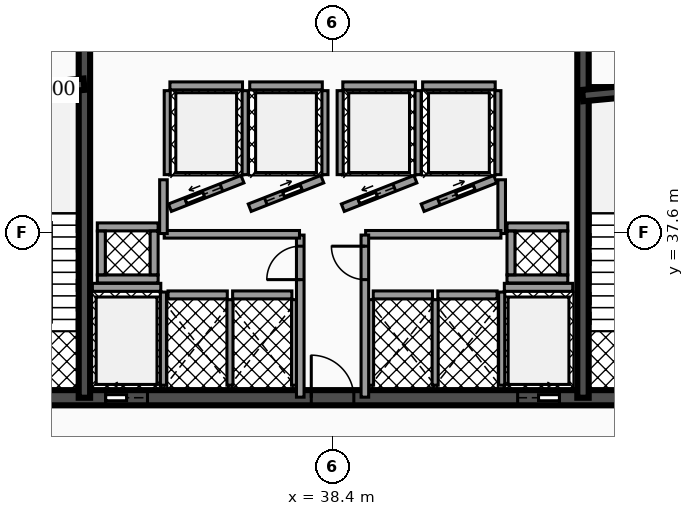
"""IFC4 building model, lengths in metres.
Left out: names, types, materials, properties, quantities, classifications, styles, units other than length and angle.
Written with IfcOpenShell. Run it as: python <this file> out.ifc"""

import sys

from ifc_helpers import new_model, si_unit, direction, frame, frame_2d, origin, place, context, subcontext, project, spatial, rectangle, extrude, element, fill, save


model = new_model("IFC4")
c1 = context("Model", 3, precision=1e-05, world=origin(), true_north=direction((0.0, 1.0)))
c2 = subcontext(c1, "Body", "Model", "MODEL_VIEW")
j1 = project(units=[si_unit("LENGTHUNIT", "METRE"), si_unit("PLANEANGLEUNIT", "RADIAN")], contexts=[c1])
p1 = place(None, origin())
s1 = spatial("IfcSite", under=j1, at=p1, CompositionType="ELEMENT")
p2 = place(p1, origin())
s2 = spatial("IfcBuilding", under=s1, at=p2, CompositionType="ELEMENT")
p3 = place(p2, frame((0.0, 0.0, 80.58)))
s3 = spatial("IfcBuildingStorey", under=s2, at=p3, CompositionType="ELEMENT", Elevation=80.58)
p4 = place(p3, frame((28.4, 33.25, 0.0), z_axis=(0.0, 0.0, 1.0), x_axis=(1.0, 0.0, 0.0)))
e1 = element("IfcWall", 1, at=p4, inside=s3, PredefinedType="SHEAR", context=c2, shape_type="SweptSolid", body=[
    extrude(rectangle(XDim=20.06, YDim=0.4, at=frame_2d((10.03, 0.0))), origin(), (0.0, 0.0, 1.0), 3.82),
])
p5 = place(p4, frame((4.03, 0.0, 0.0)))
e2 = element("IfcOpeningElement", 2, at=p5, cuts=e1, PredefinedType="OPENING", context=c2, shape_type="SweptSolid", body=[
    extrude(rectangle(XDim=1.1, YDim=2.15, at=frame_2d((0.55, 1.075))), frame((0.0, 0.21, 0.0), z_axis=(0.0, -1.0, 0.0), x_axis=(1.0, 0.0, 0.0)), (0.0, 0.0, 1.0), 0.42),
])
p6 = place(p4, frame((14.87, 0.0, 0.0)))
e3 = element("IfcOpeningElement", 3, at=p6, cuts=e1, PredefinedType="OPENING", context=c2, shape_type="SweptSolid", body=[
    extrude(rectangle(XDim=1.1, YDim=2.15, at=frame_2d((0.55, 1.075))), frame((0.0, 0.21, 0.0), z_axis=(0.0, -1.0, 0.0), x_axis=(1.0, 0.0, 0.0)), (0.0, 0.0, 1.0), 0.42),
])
p7 = place(p4, frame((1.31, 0.0, 0.0)))
e4 = element("IfcOpeningElement", 4, at=p7, cuts=e1, PredefinedType="OPENING", context=c2, shape_type="SweptSolid", body=[
    extrude(rectangle(XDim=1.1, YDim=2.2, at=frame_2d((0.55, 1.1))), frame((0.0, 0.21, 0.0), z_axis=(0.0, -1.0, 0.0), x_axis=(1.0, 0.0, 0.0)), (0.0, 0.0, 1.0), 0.42),
])
p8 = place(p4, frame((9.44, 0.0, 0.0)))
e5 = element("IfcOpeningElement", 5, at=p8, cuts=e1, PredefinedType="OPENING", context=c2, shape_type="SweptSolid", body=[
    extrude(rectangle(XDim=1.12, YDim=2.05, at=frame_2d((0.56, 1.025))), frame((0.0, 0.21, 0.0), z_axis=(0.0, -1.0, 0.0), x_axis=(1.0, 0.0, 0.0)), (0.0, 0.0, 1.0), 0.42),
])
p9 = place(p4, frame((17.65, 0.0, 0.0)))
e6 = element("IfcOpeningElement", 6, at=p9, cuts=e1, PredefinedType="OPENING", context=c2, shape_type="SweptSolid", body=[
    extrude(rectangle(XDim=1.1, YDim=2.2, at=frame_2d((0.55, 1.1))), frame((0.0, 0.21, 0.0), z_axis=(0.0, -1.0, 0.0), x_axis=(1.0, 0.0, 0.0)), (0.0, 0.0, 1.0), 0.42),
])
for number, where, z_axis, x_axis in (
    (7, (31.87, 33.25, 0.0), (0.0, 0.0, 1.0), (0.0, 1.0, 0.0)),
    (8, (44.99, 33.25, 0.0), (0.0, 0.0, 1.0), (0.0, 1.0, 0.0)),
):
    element("IfcWall", number, at=place(p3, frame(where, z_axis=z_axis, x_axis=x_axis)), inside=s3, PredefinedType="SHEAR", context=c2, shape_type="SweptSolid", body=[
        extrude(rectangle(XDim=10.2, YDim=0.3, at=frame_2d((5.1, 0.0))), origin(), (0.0, 0.0, 1.0), 3.82),
    ])
p10 = place(p3, frame((28.64, 41.2, 0.0), z_axis=(0.0, 0.0, 1.0), x_axis=(0.995687118776, 0.092774789157, 0.0)))
e9 = element("IfcWall", 9, at=p10, inside=s3, PredefinedType="SHEAR", context=c2, shape_type="SweptSolid", body=[
    extrude(rectangle(XDim=3.234, YDim=0.3, at=frame_2d((1.617, 0.0))), origin(), (0.0, 0.0, 1.0), 3.82),
])
p11 = place(p3, frame((44.98, 41.2, 0.0), z_axis=(0.0, 0.0, 1.0), x_axis=(0.995686468965, 0.09278176286, 0.0)))
e10 = element("IfcWall", 10, at=p11, inside=s3, PredefinedType="SHEAR", context=c2, shape_type="SweptSolid", body=[
    extrude(rectangle(XDim=3.234, YDim=0.3, at=frame_2d((1.617, 0.0))), origin(), (0.0, 0.0, 1.0), 3.82),
])
p12 = place(p3, frame((32.08, 36.155, 0.0), z_axis=(0.0, 0.0, 1.0), x_axis=(1.0, 0.0, 0.0)))
e11 = element("IfcWall", 11, at=p12, inside=s3, PredefinedType="SOLIDWALL", context=c2, shape_type="SweptSolid", body=[
    extrude(rectangle(XDim=1.8, YDim=0.21, at=frame_2d((0.9, 0.0))), origin(), (0.0, 0.0, 1.0), 2.792),
])
p13 = place(p3, frame((33.95, 33.58, 0.0), z_axis=(0.0, 0.0, 1.0), x_axis=(0.0, 1.0, 0.0)))
e12 = element("IfcWall", 12, at=p13, inside=s3, PredefinedType="SOLIDWALL", context=c2, shape_type="SweptSolid", body=[
    extrude(rectangle(XDim=2.45, YDim=0.16, at=frame_2d((1.225, 0.0))), origin(), (0.0, 0.0, 1.0), 2.792),
])
p14 = place(p3, frame((42.92, 36.155, 0.0), z_axis=(0.0, 0.0, 1.0), x_axis=(1.0, 0.0, 0.0)))
e13 = element("IfcWall", 13, at=p14, inside=s3, PredefinedType="SOLIDWALL", context=c2, shape_type="SweptSolid", body=[
    extrude(rectangle(XDim=1.8, YDim=0.21, at=frame_2d((0.9, 0.0))), origin(), (0.0, 0.0, 1.0), 2.792),
])
p15 = place(p3, frame((42.85, 33.58, 0.0), z_axis=(0.0, 0.0, 1.0), x_axis=(0.0, 1.0, 0.0)))
e14 = element("IfcWall", 14, at=p15, inside=s3, PredefinedType="SOLIDWALL", context=c2, shape_type="SweptSolid", body=[
    extrude(rectangle(XDim=2.45, YDim=0.16, at=frame_2d((1.225, 0.0))), origin(), (0.0, 0.0, 1.0), 2.792),
])
p16 = place(p3, frame((34.12, 38.25, 0.0), z_axis=(0.0, 0.0, 1.0), x_axis=(0.930804993012, 0.36551616241, 0.0)))
e15 = element("IfcWall", 15, at=p16, inside=s3, PredefinedType="SOLIDWALL", context=c2, shape_type="SweptSolid", body=[
    extrude(rectangle(XDim=2.052, YDim=0.21, at=frame_2d((1.026, 0.0))), origin(), (0.0, 0.0, 1.0), 2.792),
])
p17 = place(p16, frame((0.455, 0.0, 0.0)))
e16 = element("IfcOpeningElement", 16, at=p17, cuts=e15, PredefinedType="OPENING", context=c2, shape_type="SweptSolid", body=[
    extrude(rectangle(XDim=1.0, YDim=2.1, at=frame_2d((0.5, 1.05))), frame((0.0, 0.115, 0.0), z_axis=(0.0, -1.0, 0.0), x_axis=(1.0, 0.0, 0.0)), (0.0, 0.0, 1.0), 0.23),
])
p18 = place(p3, frame((34.12, 41.455, 0.0), z_axis=(0.0, 0.0, 1.0), x_axis=(1.0, 0.0, 0.0)))
e17 = element("IfcWall", 17, at=p18, inside=s3, PredefinedType="SOLIDWALL", context=c2, shape_type="SweptSolid", body=[
    extrude(rectangle(XDim=1.91, YDim=0.21, at=frame_2d((0.955, 0.0))), origin(), (0.0, 0.0, 1.0), 2.792),
])
for number, where, z_axis, x_axis in (
    (18, (34.05, 39.12, 0.0), (0.0, 0.0, 1.0), (0.0, 1.0, 0.0)),
    (19, (36.1, 39.12, 0.0), (0.0, 0.0, 1.0), (0.0, 1.0, 0.0)),
):
    element("IfcWall", number, at=place(p3, frame(where, z_axis=z_axis, x_axis=x_axis)), inside=s3, PredefinedType="SOLIDWALL", context=c2, shape_type="SweptSolid", body=[
        extrude(rectangle(XDim=2.21, YDim=0.16, at=frame_2d((1.105, 0.0))), origin(), (0.0, 0.0, 1.0), 2.792),
    ])
p19 = place(p3, frame((36.22, 38.25, 0.0), z_axis=(0.0, 0.0, 1.0), x_axis=(0.930804993012, 0.36551616241, 0.0)))
e20 = element("IfcWall", 20, at=p19, inside=s3, PredefinedType="SOLIDWALL", context=c2, shape_type="SweptSolid", body=[
    extrude(rectangle(XDim=2.052, YDim=0.21, at=frame_2d((1.026, 0.0))), origin(), (0.0, 0.0, 1.0), 2.792),
])
p20 = place(p19, frame((0.455, 0.0, 0.0)))
e21 = element("IfcOpeningElement", 21, at=p20, cuts=e20, PredefinedType="OPENING", context=c2, shape_type="SweptSolid", body=[
    extrude(rectangle(XDim=1.0, YDim=2.1, at=frame_2d((0.5, 1.05))), frame((0.0, 0.115, 0.0), z_axis=(0.0, -1.0, 0.0), x_axis=(1.0, 0.0, 0.0)), (0.0, 0.0, 1.0), 0.23),
])
p21 = place(p3, frame((36.22, 41.455, 0.0), z_axis=(0.0, 0.0, 1.0), x_axis=(1.0, 0.0, 0.0)))
e22 = element("IfcWall", 22, at=p21, inside=s3, PredefinedType="SOLIDWALL", context=c2, shape_type="SweptSolid", body=[
    extrude(rectangle(XDim=1.91, YDim=0.21, at=frame_2d((0.955, 0.0))), origin(), (0.0, 0.0, 1.0), 2.792),
])
p22 = place(p3, frame((38.2, 39.12, 0.0), z_axis=(0.0, 0.0, 1.0), x_axis=(0.0, 1.0, 0.0)))
e23 = element("IfcWall", 23, at=p22, inside=s3, PredefinedType="SOLIDWALL", context=c2, shape_type="SweptSolid", body=[
    extrude(rectangle(XDim=2.21, YDim=0.16, at=frame_2d((1.105, 0.0))), origin(), (0.0, 0.0, 1.0), 2.792),
])
p23 = place(p3, frame((38.67, 38.25, 0.0), z_axis=(0.0, 0.0, 1.0), x_axis=(0.930820886763, 0.3654756856, 0.0)))
e24 = element("IfcWall", 24, at=p23, inside=s3, PredefinedType="SOLIDWALL", context=c2, shape_type="SweptSolid", body=[
    extrude(rectangle(XDim=2.052, YDim=0.21, at=frame_2d((1.026, 0.0))), origin(), (0.0, 0.0, 1.0), 2.792),
])
p24 = place(p23, frame((0.455, 0.0, 0.0)))
e25 = element("IfcOpeningElement", 25, at=p24, cuts=e24, PredefinedType="OPENING", context=c2, shape_type="SweptSolid", body=[
    extrude(rectangle(XDim=1.0, YDim=2.1, at=frame_2d((0.5, 1.05))), frame((0.0, 0.115, 0.0), z_axis=(0.0, -1.0, 0.0), x_axis=(1.0, 0.0, 0.0)), (0.0, 0.0, 1.0), 0.23),
])
p25 = place(p3, frame((38.67, 41.455, 0.0), z_axis=(0.0, 0.0, 1.0), x_axis=(1.0, 0.0, 0.0)))
e26 = element("IfcWall", 26, at=p25, inside=s3, PredefinedType="SOLIDWALL", context=c2, shape_type="SweptSolid", body=[
    extrude(rectangle(XDim=1.91, YDim=0.21, at=frame_2d((0.955, 0.0))), origin(), (0.0, 0.0, 1.0), 2.792),
])
for number, where, z_axis, x_axis in (
    (27, (38.6, 39.12, 0.0), (0.0, 0.0, 1.0), (0.0, 1.0, 0.0)),
    (28, (40.65, 39.12, 0.0), (0.0, 0.0, 1.0), (0.0, 1.0, 0.0)),
):
    element("IfcWall", number, at=place(p3, frame(where, z_axis=z_axis, x_axis=x_axis)), inside=s3, PredefinedType="SOLIDWALL", context=c2, shape_type="SweptSolid", body=[
        extrude(rectangle(XDim=2.21, YDim=0.16, at=frame_2d((1.105, 0.0))), origin(), (0.0, 0.0, 1.0), 2.792),
    ])
p26 = place(p3, frame((40.77, 38.25, 0.0), z_axis=(0.0, 0.0, 1.0), x_axis=(0.930804993012, 0.36551616241, 0.0)))
e29 = element("IfcWall", 29, at=p26, inside=s3, PredefinedType="SOLIDWALL", context=c2, shape_type="SweptSolid", body=[
    extrude(rectangle(XDim=2.052, YDim=0.21, at=frame_2d((1.026, 0.0))), origin(), (0.0, 0.0, 1.0), 2.792),
])
p27 = place(p26, frame((0.455, 0.0, 0.0)))
e30 = element("IfcOpeningElement", 30, at=p27, cuts=e29, PredefinedType="OPENING", context=c2, shape_type="SweptSolid", body=[
    extrude(rectangle(XDim=1.0, YDim=2.1, at=frame_2d((0.5, 1.05))), frame((0.0, 0.115, 0.0), z_axis=(0.0, -1.0, 0.0), x_axis=(1.0, 0.0, 0.0)), (0.0, 0.0, 1.0), 0.23),
])
p28 = place(p3, frame((40.77, 41.455, 0.0), z_axis=(0.0, 0.0, 1.0), x_axis=(1.0, 0.0, 0.0)))
e31 = element("IfcWall", 31, at=p28, inside=s3, PredefinedType="SOLIDWALL", context=c2, shape_type="SweptSolid", body=[
    extrude(rectangle(XDim=1.91, YDim=0.21, at=frame_2d((0.955, 0.0))), origin(), (0.0, 0.0, 1.0), 2.792),
])
p29 = place(p3, frame((42.75, 39.12, 0.0), z_axis=(0.0, 0.0, 1.0), x_axis=(0.0, 1.0, 0.0)))
e32 = element("IfcWall", 32, at=p29, inside=s3, PredefinedType="SOLIDWALL", context=c2, shape_type="SweptSolid", body=[
    extrude(rectangle(XDim=2.21, YDim=0.16, at=frame_2d((1.105, 0.0))), origin(), (0.0, 0.0, 1.0), 2.792),
])
p30 = place(p3, frame((34.07, 35.955, 0.0), z_axis=(0.0, 0.0, 1.0), x_axis=(1.0, 0.0, 0.0)))
e33 = element("IfcWall", 33, at=p30, inside=s3, PredefinedType="SOLIDWALL", context=c2, shape_type="SweptSolid", body=[
    extrude(rectangle(XDim=1.56, YDim=0.21, at=frame_2d((0.78, 0.0))), origin(), (0.0, 0.0, 1.0), 2.792),
])
p31 = place(p3, frame((35.7, 33.58, 0.0), z_axis=(0.0, 0.0, 1.0), x_axis=(0.0, 1.0, 0.0)))
e34 = element("IfcWall", 34, at=p31, inside=s3, PredefinedType="SOLIDWALL", context=c2, shape_type="SweptSolid", body=[
    extrude(rectangle(XDim=2.25, YDim=0.16, at=frame_2d((1.125, 0.0))), origin(), (0.0, 0.0, 1.0), 2.792),
])
p32 = place(p3, frame((35.77, 35.955, 0.0), z_axis=(0.0, 0.0, 1.0), x_axis=(1.0, 0.0, 0.0)))
e35 = element("IfcWall", 35, at=p32, inside=s3, PredefinedType="SOLIDWALL", context=c2, shape_type="SweptSolid", body=[
    extrude(rectangle(XDim=1.56, YDim=0.21, at=frame_2d((0.78, 0.0))), origin(), (0.0, 0.0, 1.0), 2.792),
])
p33 = place(p3, frame((37.4, 33.58, 0.0), z_axis=(0.0, 0.0, 1.0), x_axis=(0.0, 1.0, 0.0)))
e36 = element("IfcWall", 36, at=p33, inside=s3, PredefinedType="SOLIDWALL", context=c2, shape_type="SweptSolid", body=[
    extrude(rectangle(XDim=2.25, YDim=0.16, at=frame_2d((1.125, 0.0))), origin(), (0.0, 0.0, 1.0), 2.792),
])
p34 = place(p3, frame((39.47, 35.955, 0.0), z_axis=(0.0, 0.0, 1.0), x_axis=(1.0, 0.0, 0.0)))
e37 = element("IfcWall", 37, at=p34, inside=s3, PredefinedType="SOLIDWALL", context=c2, shape_type="SweptSolid", body=[
    extrude(rectangle(XDim=1.56, YDim=0.21, at=frame_2d((0.78, 0.0))), origin(), (0.0, 0.0, 1.0), 2.792),
])
for number, where, z_axis, x_axis in (
    (38, (39.4, 33.58, 0.0), (0.0, 0.0, 1.0), (0.0, 1.0, 0.0)),
    (39, (41.1, 33.58, 0.0), (0.0, 0.0, 1.0), (0.0, 1.0, 0.0)),
):
    element("IfcWall", number, at=place(p3, frame(where, z_axis=z_axis, x_axis=x_axis)), inside=s3, PredefinedType="SOLIDWALL", context=c2, shape_type="SweptSolid", body=[
        extrude(rectangle(XDim=2.25, YDim=0.16, at=frame_2d((1.125, 0.0))), origin(), (0.0, 0.0, 1.0), 2.792),
    ])
p35 = place(p3, frame((41.17, 35.955, 0.0), z_axis=(0.0, 0.0, 1.0), x_axis=(1.0, 0.0, 0.0)))
e40 = element("IfcWall", 40, at=p35, inside=s3, PredefinedType="SOLIDWALL", context=c2, shape_type="SweptSolid", body=[
    extrude(rectangle(XDim=1.56, YDim=0.21, at=frame_2d((0.78, 0.0))), origin(), (0.0, 0.0, 1.0), 2.792),
])
for number, where, z_axis, x_axis in (
    (41, (32.21, 36.375, 0.0), (0.0, 0.0, 1.0), (1.0, 0.0, 0.0)),
    (42, (32.21, 37.745, 0.0), (0.0, 0.0, 1.0), (1.0, 0.0, 0.0)),
):
    element("IfcWall", number, at=place(p3, frame(where, z_axis=z_axis, x_axis=x_axis)), inside=s3, PredefinedType="SOLIDWALL", context=c2, shape_type="SweptSolid", body=[
        extrude(rectangle(XDim=1.6, YDim=0.21, at=frame_2d((0.8, 0.0))), origin(), (0.0, 0.0, 1.0), 3.82),
    ])
for number, where, z_axis, x_axis in (
    (43, (32.315, 36.485, 0.0), (0.0, 0.0, 1.0), (0.0, 1.0, 0.0)),
    (44, (33.705, 36.485, 0.0), (0.0, 0.0, 1.0), (0.0, 1.0, 0.0)),
):
    element("IfcWall", number, at=place(p3, frame(where, z_axis=z_axis, x_axis=x_axis)), inside=s3, PredefinedType="SOLIDWALL", context=c2, shape_type="SweptSolid", body=[
        extrude(rectangle(XDim=1.15, YDim=0.21, at=frame_2d((0.575, 0.0))), origin(), (0.0, 0.0, 1.0), 3.82),
    ])
for number, where, z_axis, x_axis in (
    (45, (42.99, 36.375, 0.0), (0.0, 0.0, 1.0), (1.0, 0.0, 0.0)),
    (46, (42.99, 37.745, 0.0), (0.0, 0.0, 1.0), (1.0, 0.0, 0.0)),
):
    element("IfcWall", number, at=place(p3, frame(where, z_axis=z_axis, x_axis=x_axis)), inside=s3, PredefinedType="SOLIDWALL", context=c2, shape_type="SweptSolid", body=[
        extrude(rectangle(XDim=1.6, YDim=0.21, at=frame_2d((0.8, 0.0))), origin(), (0.0, 0.0, 1.0), 3.82),
    ])
for number, where, z_axis, x_axis in (
    (47, (43.095, 36.485, 0.0), (0.0, 0.0, 1.0), (0.0, 1.0, 0.0)),
    (48, (44.485, 36.485, 0.0), (0.0, 0.0, 1.0), (0.0, 1.0, 0.0)),
):
    element("IfcWall", number, at=place(p3, frame(where, z_axis=z_axis, x_axis=x_axis)), inside=s3, PredefinedType="SOLIDWALL", context=c2, shape_type="SweptSolid", body=[
        extrude(rectangle(XDim=1.15, YDim=0.21, at=frame_2d((0.575, 0.0))), origin(), (0.0, 0.0, 1.0), 3.82),
    ])
p36 = place(p3, frame((37.55, 33.265, 0.0), z_axis=(0.0, 0.0, 1.0), x_axis=(0.0, 1.0, 0.0)))
e49 = element("IfcWall", 49, at=p36, inside=s3, PredefinedType="PARTITIONING", context=c2, shape_type="SweptSolid", body=[
    extrude(rectangle(XDim=4.265, YDim=0.2, at=frame_2d((2.133, 0.0))), origin(), (0.0, 0.0, 1.0), 2.777),
])
p37 = place(p36, frame((3.093, 0.0, 0.0)))
e50 = element("IfcOpeningElement", 50, at=p37, cuts=e49, PredefinedType="OPENING", context=c2, shape_type="SweptSolid", body=[
    extrude(rectangle(XDim=0.88, YDim=2.05, at=frame_2d((0.44, 1.025))), frame((0.0, 0.11, 0.0), z_axis=(0.0, -1.0, 0.0), x_axis=(1.0, 0.0, 0.0)), (0.0, 0.0, 1.0), 0.22),
])
p38 = place(p3, frame((33.97, 37.55, 0.0), z_axis=(0.0, 0.0, 1.0), x_axis=(1.0, 0.0, 0.0)))
e51 = element("IfcWall", 51, at=p38, inside=s3, PredefinedType="PARTITIONING", context=c2, shape_type="SweptSolid", body=[
    extrude(rectangle(XDim=3.56, YDim=0.2, at=frame_2d((1.78, 0.0))), origin(), (0.0, 0.0, 1.0), 2.777),
])
for number, where, z_axis, x_axis in (
    (52, (33.95, 37.57, 0.0), (0.0, 0.0, 1.0), (0.0, 1.0, 0.0)),
    (53, (42.85, 37.57, 0.0), (0.0, 0.0, 1.0), (0.0, 1.0, 0.0)),
):
    element("IfcWall", number, at=place(p3, frame(where, z_axis=z_axis, x_axis=x_axis)), inside=s3, PredefinedType="PARTITIONING", context=c2, shape_type="SweptSolid", body=[
        extrude(rectangle(XDim=1.415, YDim=0.2, at=frame_2d((0.708, 0.0))), origin(), (0.0, 0.0, 1.0), 2.777),
    ])
p39 = place(p3, frame((39.27, 37.55, 0.0), z_axis=(0.0, 0.0, 1.0), x_axis=(1.0, 0.0, 0.0)))
e54 = element("IfcWall", 54, at=p39, inside=s3, PredefinedType="PARTITIONING", context=c2, shape_type="SweptSolid", body=[
    extrude(rectangle(XDim=3.56, YDim=0.2, at=frame_2d((1.78, 0.0))), origin(), (0.0, 0.0, 1.0), 2.777),
])
p40 = place(p3, frame((39.25, 33.265, 0.0), z_axis=(0.0, 0.0, 1.0), x_axis=(0.0, 1.0, 0.0)))
e55 = element("IfcWall", 55, at=p40, inside=s3, PredefinedType="PARTITIONING", context=c2, shape_type="SweptSolid", body=[
    extrude(rectangle(XDim=4.265, YDim=0.2, at=frame_2d((2.133, 0.0))), origin(), (0.0, 0.0, 1.0), 2.777),
])
p41 = place(p40, frame((3.093, 0.0, 0.0)))
e56 = element("IfcOpeningElement", 56, at=p41, cuts=e55, PredefinedType="OPENING", context=c2, shape_type="SweptSolid", body=[
    extrude(rectangle(XDim=0.88, YDim=2.05, at=frame_2d((0.44, 1.025))), frame((0.0, 0.11, 0.0), z_axis=(0.0, -1.0, 0.0), x_axis=(1.0, 0.0, 0.0)), (0.0, 0.0, 1.0), 0.22),
])
p42 = place(p5, origin())
e57 = element("IfcDoor", 57, at=p42, inside=s3, OperationType="SLIDING_TO_LEFT", PredefinedType="DOOR", context=c2, shape_type="SweptSolid", body=[
    extrude(rectangle(XDim=1.1, YDim=2.15, at=frame_2d((0.55, 1.075))), frame((0.0, 0.025, 0.0), z_axis=(0.0, -1.0, 0.0), x_axis=(1.0, 0.0, 0.0)), (0.0, 0.0, 1.0), 0.05),
])
fill(e2, e57)
p43 = place(p6, origin())
e58 = element("IfcDoor", 58, at=p43, inside=s3, OperationType="SLIDING_TO_RIGHT", PredefinedType="DOOR", context=c2, shape_type="SweptSolid", body=[
    extrude(rectangle(XDim=1.1, YDim=2.15, at=frame_2d((0.55, 1.075))), frame((0.0, 0.025, 0.0), z_axis=(0.0, -1.0, 0.0), x_axis=(1.0, 0.0, 0.0)), (0.0, 0.0, 1.0), 0.05),
])
fill(e3, e58)
p44 = place(p17, origin())
e59 = element("IfcDoor", 59, at=p44, inside=s3, OperationType="SLIDING_TO_LEFT", PredefinedType="DOOR", context=c2, shape_type="SweptSolid", body=[
    extrude(rectangle(XDim=1.0, YDim=2.1, at=frame_2d((0.5, 1.05))), frame((0.0, 0.025, 0.0), z_axis=(0.0, -1.0, 0.0), x_axis=(1.0, 0.0, 0.0)), (0.0, 0.0, 1.0), 0.05),
])
fill(e16, e59)
p45 = place(p20, origin())
e60 = element("IfcDoor", 60, at=p45, inside=s3, OperationType="SLIDING_TO_RIGHT", PredefinedType="DOOR", context=c2, shape_type="SweptSolid", body=[
    extrude(rectangle(XDim=1.0, YDim=2.1, at=frame_2d((0.5, 1.05))), frame((0.0, 0.025, 0.0), z_axis=(0.0, -1.0, 0.0), x_axis=(1.0, 0.0, 0.0)), (0.0, 0.0, 1.0), 0.05),
])
fill(e21, e60)
p46 = place(p24, origin())
e61 = element("IfcDoor", 61, at=p46, inside=s3, OperationType="SLIDING_TO_LEFT", PredefinedType="DOOR", context=c2, shape_type="SweptSolid", body=[
    extrude(rectangle(XDim=1.0, YDim=2.1, at=frame_2d((0.5, 1.05))), frame((0.0, 0.025, 0.0), z_axis=(0.0, -1.0, 0.0), x_axis=(1.0, 0.0, 0.0)), (0.0, 0.0, 1.0), 0.05),
])
fill(e25, e61)
p47 = place(p27, origin())
e62 = element("IfcDoor", 62, at=p47, inside=s3, OperationType="SLIDING_TO_RIGHT", PredefinedType="DOOR", context=c2, shape_type="SweptSolid", body=[
    extrude(rectangle(XDim=1.0, YDim=2.1, at=frame_2d((0.5, 1.05))), frame((0.0, 0.025, 0.0), z_axis=(0.0, -1.0, 0.0), x_axis=(1.0, 0.0, 0.0)), (0.0, 0.0, 1.0), 0.05),
])
fill(e30, e62)
p48 = place(p8, origin())
e63 = element("IfcDoor", 63, at=p48, inside=s3, OperationType="SINGLE_SWING_LEFT", PredefinedType="DOOR", context=c2, shape_type="SweptSolid", body=[
    extrude(rectangle(XDim=1.12, YDim=2.05, at=frame_2d((0.56, 1.025))), frame((0.0, 0.025, 0.0), z_axis=(0.0, -1.0, 0.0), x_axis=(1.0, 0.0, 0.0)), (0.0, 0.0, 1.0), 0.05),
])
fill(e5, e63)
p49 = place(p37, origin())
e64 = element("IfcDoor", 64, at=p49, inside=s3, OperationType="SINGLE_SWING_LEFT", PredefinedType="DOOR", context=c2, shape_type="SweptSolid", body=[
    extrude(rectangle(XDim=0.88, YDim=2.05, at=frame_2d((0.44, 1.025))), frame((0.0, 0.025, 0.0), z_axis=(0.0, -1.0, 0.0), x_axis=(1.0, 0.0, 0.0)), (0.0, 0.0, 1.0), 0.05),
])
fill(e50, e64)
p50 = place(p41, origin())
e65 = element("IfcDoor", 65, at=p50, inside=s3, OperationType="SINGLE_SWING_RIGHT", PredefinedType="DOOR", context=c2, shape_type="SweptSolid", body=[
    extrude(rectangle(XDim=0.88, YDim=2.05, at=frame_2d((0.44, 1.025))), frame((0.0, 0.025, 0.0), z_axis=(0.0, -1.0, 0.0), x_axis=(1.0, 0.0, 0.0)), (0.0, 0.0, 1.0), 0.05),
])
fill(e56, e65)
save(model, sys.argv[1])
